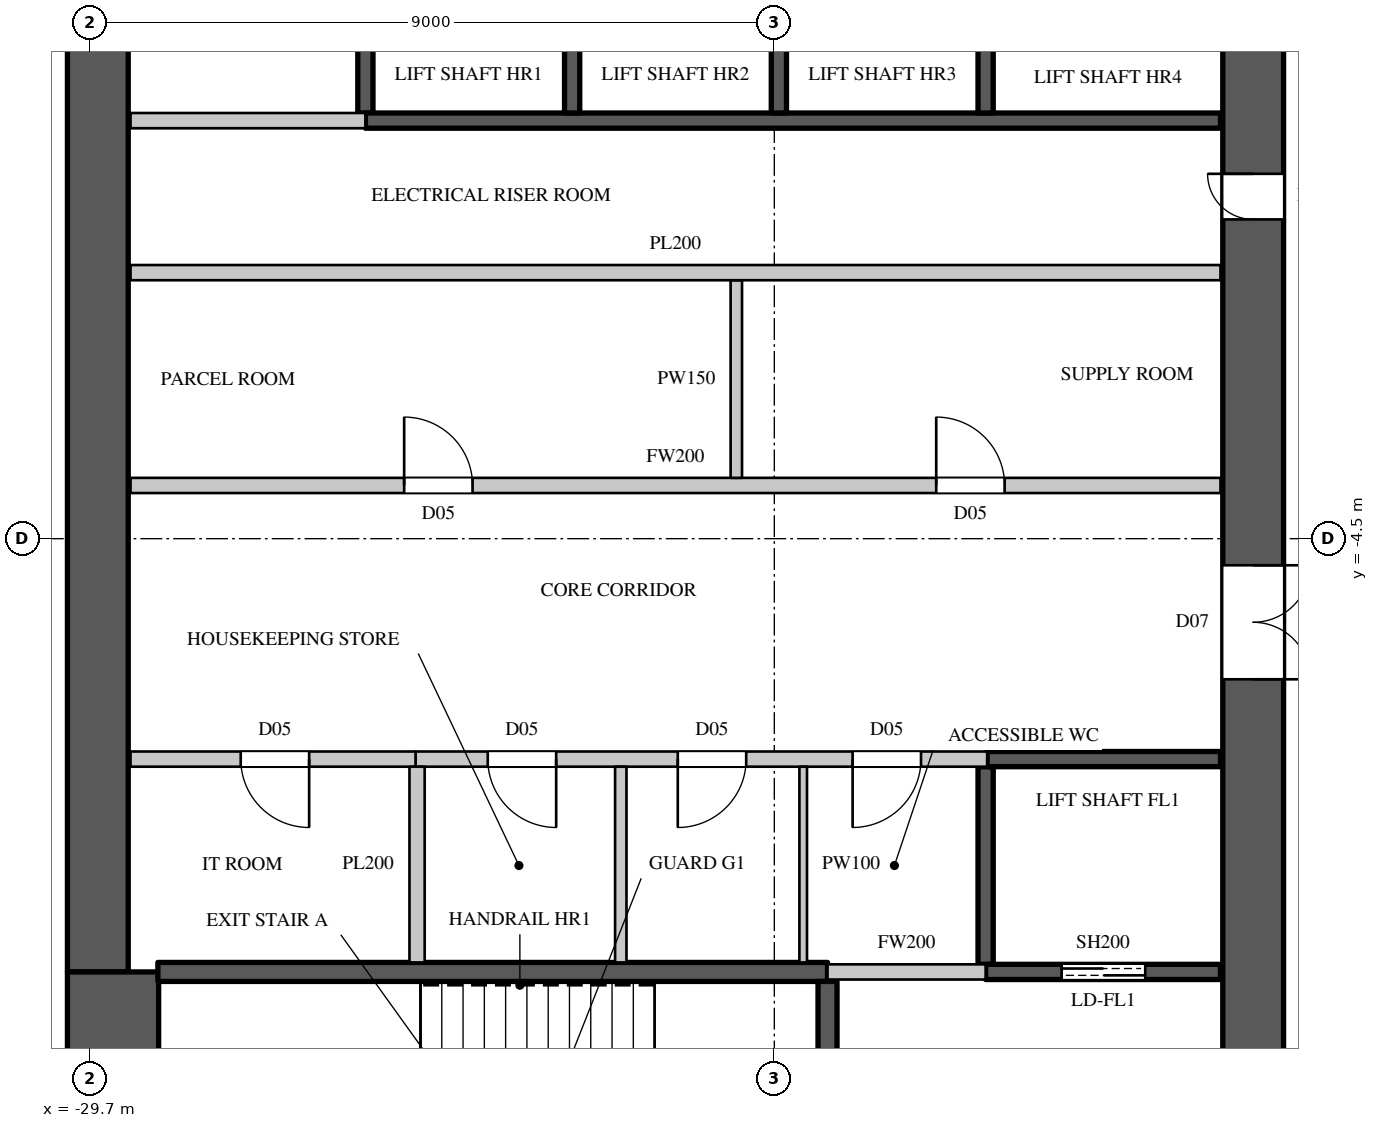
"""IFC4 building model, lengths in metres.
Left out: names, types, materials, properties, quantities, classifications, styles, units other than length and angle.
Written with IfcOpenShell. Run it as: python <this file> out.ifc"""

import sys

from ifc_helpers import new_model, si_unit, direction, frame, frame_2d, origin, place, context, subcontext, project, spatial, rectangle, extrude, element, fill, save


model = new_model("IFC4")
c1 = context("Model", 3, precision=1e-05, world=origin(), true_north=direction((0.0, 1.0)))
c2 = subcontext(c1, "Body", "Model", "MODEL_VIEW")
j1 = project(units=[si_unit("LENGTHUNIT", "METRE"), si_unit("PLANEANGLEUNIT", "RADIAN")], contexts=[c1])
p1 = place(None, origin())
s1 = spatial("IfcSite", under=j1, at=p1, CompositionType="ELEMENT")
p2 = place(p1, origin())
s2 = spatial("IfcBuilding", under=s1, at=p2, CompositionType="ELEMENT")
p3 = place(p2, frame((0.0, 0.0, 217.9)))
s3 = spatial("IfcBuildingStorey", under=s2, at=p3, CompositionType="ELEMENT", Elevation=217.9)
p4 = place(p3, frame((-14.4, -14.8, 0.0), z_axis=(0.0, 0.0, 1.0), x_axis=(0.0, 1.0, 0.0)))
e1 = element("IfcWall", 1, at=p4, inside=s3, PredefinedType="SHEAR", context=c2, shape_type="SweptSolid", body=[
    extrude(rectangle(XDim=29.6, YDim=0.8, at=frame_2d((14.8, 0.0))), origin(), (0.0, 0.0, 1.0), 4.1),
])
p5 = place(p4, frame((1.55, 0.0, 0.0)))
e2 = element("IfcOpeningElement", 2, at=p5, cuts=e1, PredefinedType="OPENING", context=c2, shape_type="SweptSolid", body=[
    extrude(rectangle(XDim=1.5, YDim=2.4, at=frame_2d((0.75, 1.2))), frame((0.0, 0.41, 0.0), z_axis=(0.0, -1.0, 0.0), x_axis=(1.0, 0.0, 0.0)), (0.0, 0.0, 1.0), 0.82),
])
p6 = place(p4, frame((26.55, 0.0, 0.0)))
e3 = element("IfcOpeningElement", 3, at=p6, cuts=e1, PredefinedType="OPENING", context=c2, shape_type="SweptSolid", body=[
    extrude(rectangle(XDim=1.5, YDim=2.4, at=frame_2d((0.75, 1.2))), frame((0.0, 0.41, 0.0), z_axis=(0.0, -1.0, 0.0), x_axis=(1.0, 0.0, 0.0)), (0.0, 0.0, 1.0), 0.82),
])
p7 = place(p4, frame((8.45, 0.0, 0.0)))
e4 = element("IfcOpeningElement", 4, at=p7, cuts=e1, PredefinedType="OPENING", context=c2, shape_type="SweptSolid", body=[
    extrude(rectangle(XDim=1.5, YDim=2.4, at=frame_2d((0.75, 1.2))), frame((0.0, 0.41, 0.0), z_axis=(0.0, -1.0, 0.0), x_axis=(1.0, 0.0, 0.0)), (0.0, 0.0, 1.0), 0.82),
])
p8 = place(p4, frame((19.65, 0.0, 0.0)))
e5 = element("IfcOpeningElement", 5, at=p8, cuts=e1, PredefinedType="OPENING", context=c2, shape_type="SweptSolid", body=[
    extrude(rectangle(XDim=1.5, YDim=2.4, at=frame_2d((0.75, 1.2))), frame((0.0, 0.41, 0.0), z_axis=(0.0, -1.0, 0.0), x_axis=(1.0, 0.0, 0.0)), (0.0, 0.0, 1.0), 0.82),
])
p9 = place(p4, frame((14.5, 0.0, 0.0)))
e6 = element("IfcOpeningElement", 6, at=p9, cuts=e1, PredefinedType="OPENING", context=c2, shape_type="SweptSolid", body=[
    extrude(rectangle(XDim=0.6, YDim=2.0, at=frame_2d((0.3, 1.0))), frame((0.0, 0.41, 0.0), z_axis=(0.0, -1.0, 0.0), x_axis=(1.0, 0.0, 0.0)), (0.0, 0.0, 1.0), 0.82),
])
p10 = place(p3, frame((-29.6, -10.2, 0.0), z_axis=(0.0, 0.0, 1.0), x_axis=(0.0, 1.0, 0.0)))
e7 = element("IfcWall", 7, at=p10, inside=s3, PredefinedType="SHEAR", context=c2, shape_type="SweptSolid", body=[
    extrude(rectangle(XDim=20.4, YDim=0.8, at=frame_2d((10.2, 0.0))), origin(), (0.0, 0.0, 1.0), 4.1),
])
p11 = place(p3, frame((-29.4, -14.8, 0.0), z_axis=(0.0, 0.0, 1.0), x_axis=(0.0, 1.0, 0.0)))
e8 = element("IfcWall", 8, at=p11, inside=s3, PredefinedType="SHEAR", context=c2, shape_type="SweptSolid", body=[
    extrude(rectangle(XDim=4.6, YDim=1.2, at=frame_2d((2.3, 0.0))), origin(), (0.0, 0.0, 1.0), 4.1),
])
p12 = place(p3, frame((-29.17, -3.8, 0.0), z_axis=(0.0, 0.0, 1.0), x_axis=(1.0, 0.0, 0.0)))
e9 = element("IfcWall", 9, at=p12, inside=s3, PredefinedType="PARTITIONING", context=c2, shape_type="SweptSolid", body=[
    extrude(rectangle(XDim=14.34, YDim=0.2, at=frame_2d((7.17, 0.0))), origin(), (0.0, 0.0, 1.0), 3.8),
])
p13 = place(p12, frame((3.6, 0.0, 0.0)))
e10 = element("IfcOpeningElement", 10, at=p13, cuts=e9, PredefinedType="OPENING", context=c2, shape_type="SweptSolid", body=[
    extrude(rectangle(XDim=0.9, YDim=2.2, at=frame_2d((0.45, 1.1))), frame((0.0, 0.11, 0.0), z_axis=(0.0, -1.0, 0.0), x_axis=(1.0, 0.0, 0.0)), (0.0, 0.0, 1.0), 0.22),
])
p14 = place(p12, frame((10.6, 0.0, 0.0)))
e11 = element("IfcOpeningElement", 11, at=p14, cuts=e9, PredefinedType="OPENING", context=c2, shape_type="SweptSolid", body=[
    extrude(rectangle(XDim=0.9, YDim=2.2, at=frame_2d((0.45, 1.1))), frame((0.0, 0.11, 0.0), z_axis=(0.0, -1.0, 0.0), x_axis=(1.0, 0.0, 0.0)), (0.0, 0.0, 1.0), 0.22),
])
p15 = place(p3, frame((-25.42, -7.4, 0.0), z_axis=(0.0, 0.0, 1.0), x_axis=(1.0, 0.0, 0.0)))
e12 = element("IfcWall", 12, at=p15, inside=s3, PredefinedType="PARTITIONING", context=c2, shape_type="SweptSolid", body=[
    extrude(rectangle(XDim=7.52, YDim=0.2, at=frame_2d((3.76, 0.0))), origin(), (0.0, 0.0, 1.0), 3.8),
])
p16 = place(p15, frame((0.95, 0.0, 0.0)))
e13 = element("IfcOpeningElement", 13, at=p16, cuts=e12, PredefinedType="OPENING", context=c2, shape_type="SweptSolid", body=[
    extrude(rectangle(XDim=0.9, YDim=2.2, at=frame_2d((0.45, 1.1))), frame((0.0, 0.11, 0.0), z_axis=(0.0, -1.0, 0.0), x_axis=(1.0, 0.0, 0.0)), (0.0, 0.0, 1.0), 0.22),
])
p17 = place(p15, frame((3.45, 0.0, 0.0)))
e14 = element("IfcOpeningElement", 14, at=p17, cuts=e12, PredefinedType="OPENING", context=c2, shape_type="SweptSolid", body=[
    extrude(rectangle(XDim=0.9, YDim=2.2, at=frame_2d((0.45, 1.1))), frame((0.0, 0.11, 0.0), z_axis=(0.0, -1.0, 0.0), x_axis=(1.0, 0.0, 0.0)), (0.0, 0.0, 1.0), 0.22),
])
p18 = place(p15, frame((5.75, 0.0, 0.0)))
e15 = element("IfcOpeningElement", 15, at=p18, cuts=e12, PredefinedType="OPENING", context=c2, shape_type="SweptSolid", body=[
    extrude(rectangle(XDim=0.9, YDim=2.2, at=frame_2d((0.45, 1.1))), frame((0.0, 0.11, 0.0), z_axis=(0.0, -1.0, 0.0), x_axis=(1.0, 0.0, 0.0)), (0.0, 0.0, 1.0), 0.22),
])
p19 = place(p3, frame((-20.0, -10.2, 0.0), z_axis=(0.0, 0.0, 1.0), x_axis=(1.0, 0.0, 0.0)))
e16 = element("IfcWall", 16, at=p19, inside=s3, PredefinedType="PARTITIONING", context=c2, shape_type="SweptSolid", body=[
    extrude(rectangle(XDim=2.08, YDim=0.2, at=frame_2d((1.04, 0.0))), origin(), (0.0, 0.0, 1.0), 3.8),
])
p20 = place(p3, frame((-22.72, -10.075, 0.0), z_axis=(0.0, 0.0, 1.0), x_axis=(0.0, 1.0, 0.0)))
e17 = element("IfcWall", 17, at=p20, inside=s3, PredefinedType="PARTITIONING", context=c2, shape_type="SweptSolid", body=[
    extrude(rectangle(XDim=2.575, YDim=0.15, at=frame_2d((1.288, 0.0))), origin(), (0.0, 0.0, 1.0), 3.8),
])
p21 = place(p3, frame((-21.2, -3.7, 0.0), z_axis=(0.0, 0.0, 1.0), x_axis=(0.0, 1.0, 0.0)))
e18 = element("IfcWall", 18, at=p21, inside=s3, PredefinedType="PARTITIONING", context=c2, shape_type="SweptSolid", body=[
    extrude(rectangle(XDim=2.6, YDim=0.15, at=frame_2d((1.3, 0.0))), origin(), (0.0, 0.0, 1.0), 3.8),
])
p22 = place(p3, frame((-29.17, -7.4, 0.0), z_axis=(0.0, 0.0, 1.0), x_axis=(1.0, 0.0, 0.0)))
e19 = element("IfcWall", 19, at=p22, inside=s3, PredefinedType="PARTITIONING", context=c2, shape_type="SweptSolid", body=[
    extrude(rectangle(XDim=3.75, YDim=0.2, at=frame_2d((1.875, 0.0))), origin(), (0.0, 0.0, 1.0), 3.8),
])
p23 = place(p22, frame((1.45, 0.0, 0.0)))
e20 = element("IfcOpeningElement", 20, at=p23, cuts=e19, PredefinedType="OPENING", context=c2, shape_type="SweptSolid", body=[
    extrude(rectangle(XDim=0.9, YDim=2.2, at=frame_2d((0.45, 1.1))), frame((0.0, 0.11, 0.0), z_axis=(0.0, -1.0, 0.0), x_axis=(1.0, 0.0, 0.0)), (0.0, 0.0, 1.0), 0.22),
])
p24 = place(p3, frame((-29.17, -1.0, 0.0), z_axis=(0.0, 0.0, 1.0), x_axis=(1.0, 0.0, 0.0)))
e21 = element("IfcWall", 21, at=p24, inside=s3, PredefinedType="PARTITIONING", context=c2, shape_type="SweptSolid", body=[
    extrude(rectangle(XDim=14.34, YDim=0.2, at=frame_2d((7.17, 0.0))), origin(), (0.0, 0.0, 1.0), 3.8),
])
p25 = place(p3, frame((-29.17, 1.0, 0.0), z_axis=(0.0, 0.0, 1.0), x_axis=(1.0, 0.0, 0.0)))
e22 = element("IfcWall", 22, at=p25, inside=s3, PredefinedType="PARTITIONING", context=c2, shape_type="SweptSolid", body=[
    extrude(rectangle(XDim=3.09, YDim=0.2, at=frame_2d((1.545, 0.0))), origin(), (0.0, 0.0, 1.0), 3.8),
])
p26 = place(p3, frame((-25.4, -10.075, 0.0), z_axis=(0.0, 0.0, 1.0), x_axis=(0.0, 1.0, 0.0)))
e23 = element("IfcWall", 23, at=p26, inside=s3, PredefinedType="PARTITIONING", context=c2, shape_type="SweptSolid", body=[
    extrude(rectangle(XDim=2.575, YDim=0.2, at=frame_2d((1.288, 0.0))), origin(), (0.0, 0.0, 1.0), 3.8),
])
p27 = place(p3, frame((-26.08, 1.1, 0.0), z_axis=(0.0, 0.0, 1.0), x_axis=(0.0, 1.0, 0.0)))
e24 = element("IfcWall", 24, at=p27, inside=s3, PredefinedType="SHEAR", context=c2, shape_type="SweptSolid", body=[
    extrude(rectangle(XDim=2.6, YDim=0.2, at=frame_2d((1.3, 0.0))), origin(), (0.0, 0.0, 1.0), 3.8),
])
p28 = place(p3, frame((-26.08, 1.0, 0.0), z_axis=(0.0, 0.0, 1.0), x_axis=(1.0, 0.0, 0.0)))
e25 = element("IfcWall", 25, at=p28, inside=s3, PredefinedType="SHEAR", context=c2, shape_type="SweptSolid", body=[
    extrude(rectangle(XDim=11.25, YDim=0.2, at=frame_2d((5.625, 0.0))), origin(), (0.0, 0.0, 1.0), 3.8),
])
for number, where, z_axis, x_axis in (
    (26, (-23.36, 1.1, 0.0), (0.0, 0.0, 1.0), (0.0, 1.0, 0.0)),
    (27, (-20.64, 1.1, 0.0), (0.0, 0.0, 1.0), (0.0, 1.0, 0.0)),
):
    element("IfcWall", number, at=place(p3, frame(where, z_axis=z_axis, x_axis=x_axis)), inside=s3, PredefinedType="SHEAR", context=c2, shape_type="SweptSolid", body=[
        extrude(rectangle(XDim=2.6, YDim=0.2, at=frame_2d((1.3, 0.0))), origin(), (0.0, 0.0, 1.0), 4.1),
    ])
p29 = place(p3, frame((-17.92, -10.1, 0.0), z_axis=(0.0, 0.0, 1.0), x_axis=(0.0, 1.0, 0.0)))
e28 = element("IfcWall", 28, at=p29, inside=s3, PredefinedType="SHEAR", context=c2, shape_type="SweptSolid", body=[
    extrude(rectangle(XDim=2.6, YDim=0.2, at=frame_2d((1.3, 0.0))), origin(), (0.0, 0.0, 1.0), 3.8),
])
p30 = place(p3, frame((-17.92, -10.2, 0.0), z_axis=(0.0, 0.0, 1.0), x_axis=(1.0, 0.0, 0.0)))
e29 = element("IfcWall", 29, at=p30, inside=s3, PredefinedType="SHEAR", context=c2, shape_type="SweptSolid", body=[
    extrude(rectangle(XDim=3.09, YDim=0.2, at=frame_2d((1.545, 0.0))), origin(), (0.0, 0.0, 1.0), 3.8),
])
p31 = place(p30, frame((1.0, 0.0, 0.0)))
e30 = element("IfcOpeningElement", 30, at=p31, cuts=e29, PredefinedType="OPENING", context=c2, shape_type="SweptSolid", body=[
    extrude(rectangle(XDim=1.1, YDim=2.2, at=frame_2d((0.55, 1.1))), frame((0.0, 0.11, 0.0), z_axis=(0.0, -1.0, 0.0), x_axis=(1.0, 0.0, 0.0)), (0.0, 0.0, 1.0), 0.22),
])
p32 = place(p3, frame((-17.9, -7.4, 0.0), z_axis=(0.0, 0.0, 1.0), x_axis=(1.0, 0.0, 0.0)))
e31 = element("IfcWall", 31, at=p32, inside=s3, PredefinedType="SHEAR", context=c2, shape_type="SweptSolid", body=[
    extrude(rectangle(XDim=3.07, YDim=0.2, at=frame_2d((1.535, 0.0))), origin(), (0.0, 0.0, 1.0), 3.8),
])
p33 = place(p3, frame((-17.92, 1.1, 0.0), z_axis=(0.0, 0.0, 1.0), x_axis=(0.0, 1.0, 0.0)))
e32 = element("IfcWall", 32, at=p33, inside=s3, PredefinedType="SHEAR", context=c2, shape_type="SweptSolid", body=[
    extrude(rectangle(XDim=2.6, YDim=0.2, at=frame_2d((1.3, 0.0))), origin(), (0.0, 0.0, 1.0), 4.1),
])
p34 = place(p3, frame((-28.81, -10.2, 0.0), z_axis=(0.0, 0.0, 1.0), x_axis=(1.0, 0.0, 0.0)))
e33 = element("IfcWall", 33, at=p34, inside=s3, PredefinedType="SHEAR", context=c2, shape_type="SweptSolid", body=[
    extrude(rectangle(XDim=8.81, YDim=0.25, at=frame_2d((4.405, 0.0))), origin(), (0.0, 0.0, 1.0), 3.8),
])
p35 = place(p3, frame((-20.0, -14.77, 0.0), z_axis=(0.0, 0.0, 1.0), x_axis=(0.0, 1.0, 0.0)))
e34 = element("IfcWall", 34, at=p35, inside=s3, PredefinedType="SHEAR", context=c2, shape_type="SweptSolid", body=[
    extrude(rectangle(XDim=4.445, YDim=0.25, at=frame_2d((2.223, 0.0))), origin(), (0.0, 0.0, 1.0), 3.8),
])
p36 = place(p35, frame((1.7, 0.0, 0.0)))
e35 = element("IfcOpeningElement", 35, at=p36, cuts=e34, PredefinedType="OPENING", context=c2, shape_type="SweptSolid", body=[
    extrude(rectangle(XDim=1.1, YDim=2.2, at=frame_2d((0.55, 1.1))), frame((0.0, 0.135, 0.0), z_axis=(0.0, -1.0, 0.0), x_axis=(1.0, 0.0, 0.0)), (0.0, 0.0, 1.0), 0.27),
])
p37 = place(p3, frame((-20.32, -10.075, 0.0), z_axis=(0.0, 0.0, 1.0), x_axis=(0.0, 1.0, 0.0)))
e36 = element("IfcWall", 36, at=p37, inside=s3, PredefinedType="PARTITIONING", context=c2, shape_type="SweptSolid", body=[
    extrude(rectangle(XDim=2.575, YDim=0.1, at=frame_2d((1.288, 0.0))), origin(), (0.0, 0.0, 1.0), 3.8),
])
p38 = place(p23, origin())
e37 = element("IfcDoor", 37, at=p38, inside=s3, OperationType="SINGLE_SWING_LEFT", PredefinedType="DOOR", context=c2, shape_type="SweptSolid", body=[
    extrude(rectangle(XDim=0.9, YDim=2.2, at=frame_2d((0.45, 1.1))), frame((0.0, 0.025, 0.0), z_axis=(0.0, -1.0, 0.0), x_axis=(1.0, 0.0, 0.0)), (0.0, 0.0, 1.0), 0.05),
])
fill(e20, e37)
p39 = place(p16, origin())
e38 = element("IfcDoor", 38, at=p39, inside=s3, OperationType="SINGLE_SWING_LEFT", PredefinedType="DOOR", context=c2, shape_type="SweptSolid", body=[
    extrude(rectangle(XDim=0.9, YDim=2.2, at=frame_2d((0.45, 1.1))), frame((0.0, 0.025, 0.0), z_axis=(0.0, -1.0, 0.0), x_axis=(1.0, 0.0, 0.0)), (0.0, 0.0, 1.0), 0.05),
])
fill(e13, e38)
p40 = place(p17, origin())
e39 = element("IfcDoor", 39, at=p40, inside=s3, OperationType="SINGLE_SWING_RIGHT", PredefinedType="DOOR", context=c2, shape_type="SweptSolid", body=[
    extrude(rectangle(XDim=0.9, YDim=2.2, at=frame_2d((0.45, 1.1))), frame((0.0, 0.025, 0.0), z_axis=(0.0, -1.0, 0.0), x_axis=(1.0, 0.0, 0.0)), (0.0, 0.0, 1.0), 0.05),
])
fill(e14, e39)
p41 = place(p18, origin())
e40 = element("IfcDoor", 40, at=p41, inside=s3, OperationType="SINGLE_SWING_RIGHT", PredefinedType="DOOR", context=c2, shape_type="SweptSolid", body=[
    extrude(rectangle(XDim=0.9, YDim=2.2, at=frame_2d((0.45, 1.1))), frame((0.0, 0.025, 0.0), z_axis=(0.0, -1.0, 0.0), x_axis=(1.0, 0.0, 0.0)), (0.0, 0.0, 1.0), 0.05),
])
fill(e15, e40)
p42 = place(p13, origin())
e41 = element("IfcDoor", 41, at=p42, inside=s3, OperationType="SINGLE_SWING_LEFT", PredefinedType="DOOR", context=c2, shape_type="SweptSolid", body=[
    extrude(rectangle(XDim=0.9, YDim=2.2, at=frame_2d((0.45, 1.1))), frame((0.0, 0.025, 0.0), z_axis=(0.0, -1.0, 0.0), x_axis=(1.0, 0.0, 0.0)), (0.0, 0.0, 1.0), 0.05),
])
fill(e10, e41)
p43 = place(p14, origin())
e42 = element("IfcDoor", 42, at=p43, inside=s3, OperationType="SINGLE_SWING_LEFT", PredefinedType="DOOR", context=c2, shape_type="SweptSolid", body=[
    extrude(rectangle(XDim=0.9, YDim=2.2, at=frame_2d((0.45, 1.1))), frame((0.0, 0.025, 0.0), z_axis=(0.0, -1.0, 0.0), x_axis=(1.0, 0.0, 0.0)), (0.0, 0.0, 1.0), 0.05),
])
fill(e11, e42)
p44 = place(p31, origin())
e43 = element("IfcDoor", 43, at=p44, inside=s3, OperationType="DOUBLE_DOOR_SLIDING", PredefinedType="DOOR", context=c2, shape_type="SweptSolid", body=[
    extrude(rectangle(XDim=1.1, YDim=2.2, at=frame_2d((0.55, 1.1))), frame((0.0, 0.025, 0.0), z_axis=(0.0, -1.0, 0.0), x_axis=(1.0, 0.0, 0.0)), (0.0, 0.0, 1.0), 0.05),
])
fill(e30, e43)
p45 = place(p7, origin())
e44 = element("IfcDoor", 44, at=p45, inside=s3, OperationType="DOUBLE_DOOR_SINGLE_SWING", PredefinedType="DOOR", context=c2, shape_type="SweptSolid", body=[
    extrude(rectangle(XDim=1.5, YDim=2.4, at=frame_2d((0.75, 1.2))), frame((0.0, -0.345, 0.0), z_axis=(0.0, -1.0, 0.0), x_axis=(1.0, 0.0, 0.0)), (0.0, 0.0, 1.0), 0.05),
])
fill(e4, e44)
p46 = place(p9, origin())
e45 = element("IfcDoor", 45, at=p46, inside=s3, OperationType="SINGLE_SWING_RIGHT", PredefinedType="DOOR", context=c2, shape_type="SweptSolid", body=[
    extrude(rectangle(XDim=0.6, YDim=2.0, at=frame_2d((0.3, 1.0))), frame((0.0, 0.395, 0.0), z_axis=(0.0, -1.0, 0.0), x_axis=(1.0, 0.0, 0.0)), (0.0, 0.0, 1.0), 0.05),
])
fill(e6, e45)
save(model, sys.argv[1])
